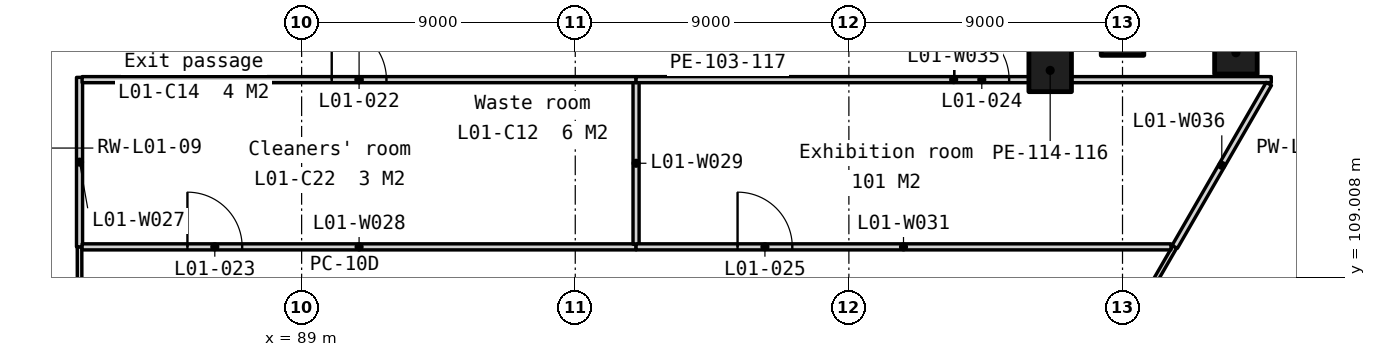
"""IFC4 building model, lengths in metres.
Left out: names, types, materials, properties, quantities, classifications, styles, units other than length and angle.
Written with IfcOpenShell. Run it as: python <this file> out.ifc"""

import sys

from ifc_helpers import new_model, si_unit, direction, frame, frame_2d, origin, origin_2d, place, context, subcontext, project, spatial, rectangle, extrude, element, fill, save


model = new_model("IFC4")
c1 = context("Model", 3, precision=1e-05, world=origin(), true_north=direction((0.0, 1.0)))
c2 = subcontext(c1, "Body", "Model", "MODEL_VIEW")
j1 = project(units=[si_unit("LENGTHUNIT", "METRE"), si_unit("PLANEANGLEUNIT", "RADIAN")], contexts=[c1])
p1 = place(None, origin())
s1 = spatial("IfcSite", under=j1, at=p1, CompositionType="ELEMENT")
p2 = place(p1, origin())
s2 = spatial("IfcBuilding", under=s1, at=p2, CompositionType="ELEMENT")
p3 = place(p2, frame((0.0, 0.0, 7.5)))
s3 = spatial("IfcBuildingStorey", under=s2, at=p3, CompositionType="ELEMENT", Elevation=7.5)
for number, where, z_axis, x_axis in (
    (1, (116.0, 117.0, 0.0), (0.0, 0.0, 1.0), (1.0, 0.0, 0.0)),
    (2, (113.621, 115.805, 0.0), (0.0, 0.0, 1.0), (1.0, 0.0, 0.0)),
    (3, (119.73, 116.385, 0.0), (0.0, 0.0, 1.0), (1.0, 0.0, 0.0)),
):
    element("IfcColumn", number, at=place(p3, frame(where, z_axis=z_axis, x_axis=x_axis)), inside=s3, PredefinedType="COLUMN", context=c2, shape_type="SweptSolid", body=[
        extrude(rectangle(XDim=1.4, YDim=1.4, at=origin_2d()), origin(), (0.0, 0.0, 1.0), 6.0),
    ])
p4 = place(p3, frame((81.705, 104.075, 0.0), z_axis=(0.0, 0.0, 1.0), x_axis=(-0.00164819093, 0.999998641732, 0.0)))
e4 = element("IfcWall", 4, at=p4, inside=s3, PredefinedType="PARTITIONING", context=c2, shape_type="SweptSolid", body=[
    extrude(rectangle(XDim=5.925, YDim=0.15, at=frame_2d((2.962, 0.0))), origin(), (0.0, 0.0, 1.0), 5.7),
])
p5 = place(p3, frame((81.695, 110.0, 0.0), z_axis=(0.0, 0.0, 1.0), x_axis=(0.0, 1.0, 0.0)))
e5 = element("IfcWall", 5, at=p5, inside=s3, PredefinedType="PARTITIONING", context=c2, shape_type="SweptSolid", body=[
    extrude(rectangle(XDim=5.575, YDim=0.2, at=frame_2d((2.788, 0.0))), origin(), (0.0, 0.0, 1.0), 5.7),
])
p6 = place(p3, frame((81.78, 110.0, 0.0), z_axis=(0.0, 0.0, 1.0), x_axis=(1.0, 0.0, 0.0)))
e6 = element("IfcWall", 6, at=p6, inside=s3, PredefinedType="PARTITIONING", context=c2, shape_type="SweptSolid", body=[
    extrude(rectangle(XDim=18.22, YDim=0.2, at=frame_2d((9.11, 0.0))), origin(), (0.0, 0.0, 1.0), 5.7),
])
p7 = place(p6, frame((3.464, 0.0, 0.0)))
e7 = element("IfcOpeningElement", 7, at=p7, cuts=e6, PredefinedType="OPENING", context=c2, shape_type="SweptSolid", body=[
    extrude(rectangle(XDim=1.8, YDim=2.1, at=frame_2d((0.9, 1.05))), frame((0.0, 0.11, 0.0), z_axis=(0.0, -1.0, 0.0), x_axis=(1.0, 0.0, 0.0)), (0.0, 0.0, 1.0), 0.22),
])
p8 = place(p3, frame((100.0, 110.085, 0.0), z_axis=(0.0, 0.0, 1.0), x_axis=(0.0, 1.0, 0.0)))
e8 = element("IfcWall", 8, at=p8, inside=s3, PredefinedType="PARTITIONING", context=c2, shape_type="SweptSolid", body=[
    extrude(rectangle(XDim=5.33, YDim=0.2, at=frame_2d((2.665, 0.0))), origin(), (0.0, 0.0, 1.0), 5.7),
])
p9 = place(p3, frame((94.624, 70.0, 0.0), z_axis=(0.0, 0.0, 1.0), x_axis=(0.499999730012, 0.866025559662, 0.0)))
e9 = element("IfcWall", 9, at=p9, inside=s3, PredefinedType="PARTITIONING", context=c2, shape_type="SweptSolid", body=[
    extrude(rectangle(XDim=46.188, YDim=0.15, at=frame_2d((23.094, 0.0))), origin(), (0.0, 0.0, 1.0), 5.7),
])
p10 = place(p9, frame((9.058, 0.0, 0.0)))
e10 = element("IfcOpeningElement", 10, at=p10, cuts=e9, PredefinedType="OPENING", context=c2, shape_type="SweptSolid", body=[
    extrude(rectangle(XDim=1.8, YDim=2.1, at=frame_2d((0.9, 1.05))), frame((0.0, 0.085, 0.0), z_axis=(0.0, -1.0, 0.0), x_axis=(1.0, 0.0, 0.0)), (0.0, 0.0, 1.0), 0.17),
])
p11 = place(p3, frame((100.0, 110.0, 0.0), z_axis=(0.0, 0.0, 1.0), x_axis=(1.0, 0.0, 0.0)))
e11 = element("IfcWall", 11, at=p11, inside=s3, PredefinedType="PARTITIONING", context=c2, shape_type="SweptSolid", body=[
    extrude(rectangle(XDim=17.593, YDim=0.2, at=frame_2d((8.796, 0.0))), origin(), (0.0, 0.0, 1.0), 5.7),
])
p12 = place(p11, frame((3.339, 0.0, 0.0)))
e12 = element("IfcOpeningElement", 12, at=p12, cuts=e11, PredefinedType="OPENING", context=c2, shape_type="SweptSolid", body=[
    extrude(rectangle(XDim=1.8, YDim=2.1, at=frame_2d((0.9, 1.05))), frame((0.0, 0.11, 0.0), z_axis=(0.0, -1.0, 0.0), x_axis=(1.0, 0.0, 0.0)), (0.0, 0.0, 1.0), 0.22),
])
p13 = place(p3, frame((81.78, 115.5, 0.0), z_axis=(0.0, 0.0, 1.0), x_axis=(1.0, 0.0, 0.0)))
e13 = element("IfcWall", 13, at=p13, inside=s3, PredefinedType="PARTITIONING", context=c2, shape_type="SweptSolid", body=[
    extrude(rectangle(XDim=18.22, YDim=0.2, at=frame_2d((9.11, 0.0))), origin(), (0.0, 0.0, 1.0), 5.7),
])
p14 = place(p13, frame((8.21, 0.0, 0.0)))
e14 = element("IfcOpeningElement", 14, at=p14, cuts=e13, PredefinedType="OPENING", context=c2, shape_type="SweptSolid", body=[
    extrude(rectangle(XDim=1.8, YDim=2.1, at=frame_2d((0.9, 1.05))), frame((0.0, 0.11, 0.0), z_axis=(0.0, -1.0, 0.0), x_axis=(1.0, 0.0, 0.0)), (0.0, 0.0, 1.0), 0.22),
])
p15 = place(p3, frame((100.0, 115.5, 0.0), z_axis=(0.0, 0.0, 1.0), x_axis=(1.0, 0.0, 0.0)))
e15 = element("IfcWall", 15, at=p15, inside=s3, PredefinedType="PARTITIONING", context=c2, shape_type="SweptSolid", body=[
    extrude(rectangle(XDim=20.893, YDim=0.2, at=frame_2d((10.447, 0.0))), origin(), (0.0, 0.0, 1.0), 5.7),
])
p16 = place(p15, frame((10.471, 0.0, 0.0)))
e16 = element("IfcOpeningElement", 16, at=p16, cuts=e15, PredefinedType="OPENING", context=c2, shape_type="SweptSolid", body=[
    extrude(rectangle(XDim=1.8, YDim=2.1, at=frame_2d((0.9, 1.05))), frame((0.0, 0.11, 0.0), z_axis=(0.0, -1.0, 0.0), x_axis=(1.0, 0.0, 0.0)), (0.0, 0.0, 1.0), 0.22),
])
p17 = place(p3, frame((117.718, 110.0, 0.0), z_axis=(0.0, 0.0, 1.0), x_axis=(0.499994402361, 0.866028635559, 0.0)))
e17 = element("IfcWall", 17, at=p17, inside=s3, PredefinedType="PARTITIONING", context=c2, shape_type="SweptSolid", body=[
    extrude(rectangle(XDim=6.191, YDim=0.2, at=frame_2d((3.095, 0.0))), origin(), (0.0, 0.0, 1.0), 5.7),
])
p18 = place(p14, origin())
e18 = element("IfcDoor", 18, at=p18, inside=s3, OperationType="SINGLE_SWING_LEFT", PredefinedType="DOOR", context=c2, shape_type="SweptSolid", body=[
    extrude(rectangle(XDim=1.8, YDim=2.1, at=frame_2d((0.9, 1.05))), frame((0.0, 0.025, 0.0), z_axis=(0.0, -1.0, 0.0), x_axis=(1.0, 0.0, 0.0)), (0.0, 0.0, 1.0), 0.05),
])
fill(e14, e18)
p19 = place(p7, origin())
e19 = element("IfcDoor", 19, at=p19, inside=s3, OperationType="SINGLE_SWING_LEFT", PredefinedType="DOOR", context=c2, shape_type="SweptSolid", body=[
    extrude(rectangle(XDim=1.8, YDim=2.1, at=frame_2d((0.9, 1.05))), frame((0.0, 0.025, 0.0), z_axis=(0.0, -1.0, 0.0), x_axis=(1.0, 0.0, 0.0)), (0.0, 0.0, 1.0), 0.05),
])
fill(e7, e19)
p20 = place(p16, origin())
e20 = element("IfcDoor", 20, at=p20, inside=s3, OperationType="SINGLE_SWING_LEFT", PredefinedType="DOOR", context=c2, shape_type="SweptSolid", body=[
    extrude(rectangle(XDim=1.8, YDim=2.1, at=frame_2d((0.9, 1.05))), frame((0.0, 0.025, 0.0), z_axis=(0.0, -1.0, 0.0), x_axis=(1.0, 0.0, 0.0)), (0.0, 0.0, 1.0), 0.05),
])
fill(e16, e20)
p21 = place(p12, origin())
e21 = element("IfcDoor", 21, at=p21, inside=s3, OperationType="SINGLE_SWING_LEFT", PredefinedType="DOOR", context=c2, shape_type="SweptSolid", body=[
    extrude(rectangle(XDim=1.8, YDim=2.1, at=frame_2d((0.9, 1.05))), frame((0.0, 0.025, 0.0), z_axis=(0.0, -1.0, 0.0), x_axis=(1.0, 0.0, 0.0)), (0.0, 0.0, 1.0), 0.05),
])
fill(e12, e21)
save(model, sys.argv[1])
